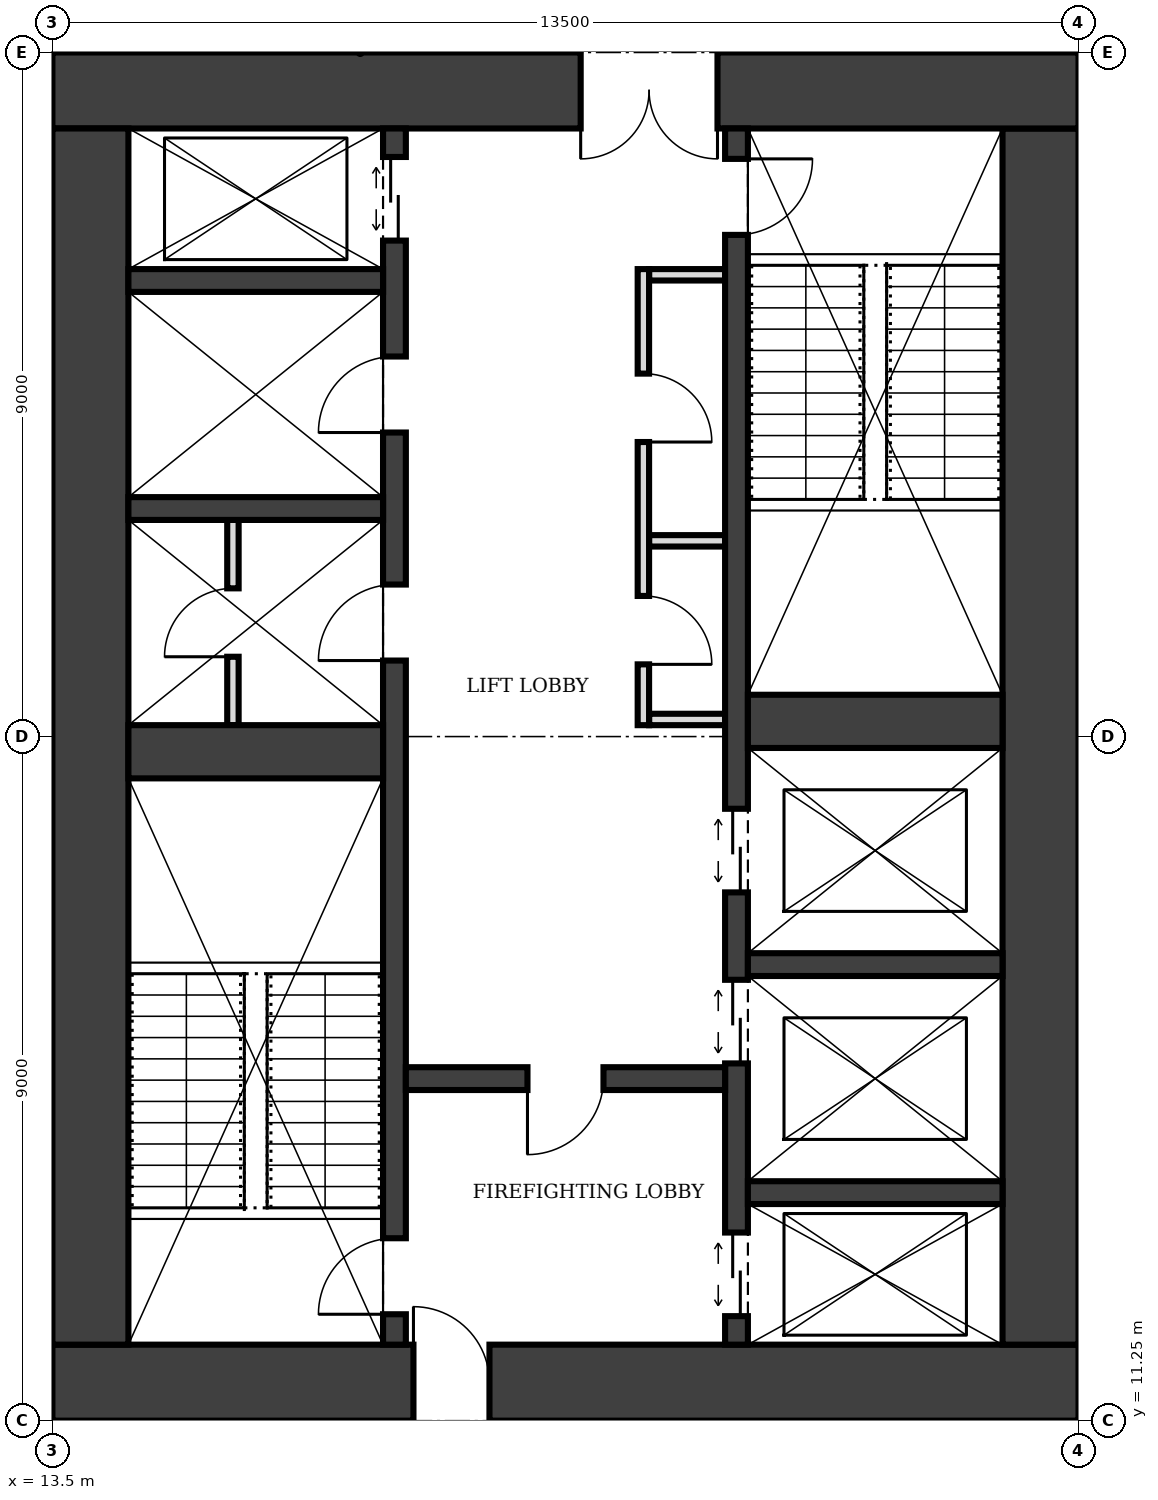
"""IFC4 building model, lengths in metres.
Left out: names, types, materials, properties, quantities, classifications, styles, units other than length and angle.
Written with IfcOpenShell. Run it as: python <this file> out.ifc"""

import sys

from ifc_helpers import new_model, si_unit, direction, frame, frame_2d, origin, place, context, subcontext, project, spatial, rectangle, extrude, element, fill, save


model = new_model("IFC4")
c1 = context("Model", 3, precision=1e-05, world=origin(), true_north=direction((0.0, 1.0)))
c2 = subcontext(c1, "Body", "Model", "MODEL_VIEW")
j1 = project(units=[si_unit("LENGTHUNIT", "METRE"), si_unit("PLANEANGLEUNIT", "RADIAN")], contexts=[c1])
p1 = place(None, origin())
s1 = spatial("IfcSite", under=j1, at=p1, CompositionType="ELEMENT")
p2 = place(p1, origin())
s2 = spatial("IfcBuilding", under=s1, at=p2, CompositionType="ELEMENT")
p3 = place(p2, frame((0.0, 0.0, 121.0)))
s3 = spatial("IfcBuildingStorey", under=s2, at=p3, CompositionType="ELEMENT", Elevation=121.0)
p4 = place(p3, frame((13.5, 11.75, 0.0), z_axis=(0.0, 0.0, 1.0), x_axis=(1.0, 0.0, 0.0)))
e1 = element("IfcWall", 1, at=p4, inside=s3, PredefinedType="SHEAR", context=c2, shape_type="SweptSolid", body=[
    extrude(rectangle(XDim=13.5, YDim=1.0, at=frame_2d((6.75, 0.0))), origin(), (0.0, 0.0, 1.0), 4.0),
])
p5 = place(p4, frame((4.75, 0.0, 0.0)))
e2 = element("IfcOpeningElement", 2, at=p5, cuts=e1, PredefinedType="OPENING", context=c2, shape_type="SweptSolid", body=[
    extrude(rectangle(XDim=1.0, YDim=2.1, at=frame_2d((0.5, 1.05))), frame((0.0, 0.51, 0.0), z_axis=(0.0, -1.0, 0.0), x_axis=(1.0, 0.0, 0.0)), (0.0, 0.0, 1.0), 1.02),
])
p6 = place(p3, frame((26.5, 12.25, 0.0), z_axis=(0.0, 0.0, 1.0), x_axis=(0.0, 1.0, 0.0)))
e3 = element("IfcWall", 3, at=p6, inside=s3, PredefinedType="SHEAR", context=c2, shape_type="SweptSolid", body=[
    extrude(rectangle(XDim=16.0, YDim=1.0, at=frame_2d((8.0, 0.0))), origin(), (0.0, 0.0, 1.0), 4.0),
])
p7 = place(p3, frame((27.0, 28.75, 0.0), z_axis=(0.0, 0.0, 1.0), x_axis=(-1.0, 0.0, 0.0)))
e4 = element("IfcWall", 4, at=p7, inside=s3, PredefinedType="SHEAR", context=c2, shape_type="SweptSolid", body=[
    extrude(rectangle(XDim=13.5, YDim=1.0, at=frame_2d((6.75, 0.0))), origin(), (0.0, 0.0, 1.0), 4.0),
])
p8 = place(p7, frame((4.75, 0.0, 0.0)))
e5 = element("IfcOpeningElement", 5, at=p8, cuts=e4, PredefinedType="OPENING", context=c2, shape_type="SweptSolid", body=[
    extrude(rectangle(XDim=1.8, YDim=2.1, at=frame_2d((0.9, 1.05))), frame((0.0, 0.51, 0.0), z_axis=(0.0, -1.0, 0.0), x_axis=(1.0, 0.0, 0.0)), (0.0, 0.0, 1.0), 1.02),
])
p9 = place(p3, frame((14.0, 28.25, 0.0), z_axis=(0.0, 0.0, 1.0), x_axis=(0.0, -1.0, 0.0)))
e6 = element("IfcWall", 6, at=p9, inside=s3, PredefinedType="SHEAR", context=c2, shape_type="SweptSolid", body=[
    extrude(rectangle(XDim=16.0, YDim=1.0, at=frame_2d((8.0, 0.0))), origin(), (0.0, 0.0, 1.0), 4.0),
])
p10 = place(p3, frame((18.0, 12.25, 0.0), z_axis=(0.0, 0.0, 1.0), x_axis=(0.0, 1.0, 0.0)))
e7 = element("IfcWall", 7, at=p10, inside=s3, PredefinedType="SHEAR", context=c2, shape_type="SweptSolid", body=[
    extrude(rectangle(XDim=16.0, YDim=0.3, at=frame_2d((8.0, 0.0))), origin(), (0.0, 0.0, 1.0), 4.0),
])
p11 = place(p10, frame((0.4, 0.0, 0.0)))
e8 = element("IfcOpeningElement", 8, at=p11, cuts=e7, PredefinedType="OPENING", context=c2, shape_type="SweptSolid", body=[
    extrude(rectangle(XDim=1.0, YDim=2.1, at=frame_2d((0.5, 1.05))), frame((0.0, 0.16, 0.0), z_axis=(0.0, -1.0, 0.0), x_axis=(1.0, 0.0, 0.0)), (0.0, 0.0, 1.0), 0.32),
])
p12 = place(p10, frame((14.525, 0.0, 0.0)))
e9 = element("IfcOpeningElement", 9, at=p12, cuts=e7, PredefinedType="OPENING", context=c2, shape_type="SweptSolid", body=[
    extrude(rectangle(XDim=1.1, YDim=2.1, at=frame_2d((0.55, 1.05))), frame((0.0, 0.16, 0.0), z_axis=(0.0, -1.0, 0.0), x_axis=(1.0, 0.0, 0.0)), (0.0, 0.0, 1.0), 0.32),
])
p13 = place(p10, frame((9.0, 0.0, 0.0)))
e10 = element("IfcOpeningElement", 10, at=p13, cuts=e7, PredefinedType="OPENING", context=c2, shape_type="SweptSolid", body=[
    extrude(rectangle(XDim=1.0, YDim=2.1, at=frame_2d((0.5, 1.05))), frame((0.0, 0.16, 0.0), z_axis=(0.0, -1.0, 0.0), x_axis=(1.0, 0.0, 0.0)), (0.0, 0.0, 1.0), 0.32),
])
p14 = place(p10, frame((12.0, 0.0, 0.0)))
e11 = element("IfcOpeningElement", 11, at=p14, cuts=e7, PredefinedType="OPENING", context=c2, shape_type="SweptSolid", body=[
    extrude(rectangle(XDim=1.0, YDim=2.1, at=frame_2d((0.5, 1.05))), frame((0.0, 0.16, 0.0), z_axis=(0.0, -1.0, 0.0), x_axis=(1.0, 0.0, 0.0)), (0.0, 0.0, 1.0), 0.32),
])
p15 = place(p3, frame((22.5, 12.25, 0.0), z_axis=(0.0, 0.0, 1.0), x_axis=(0.0, 1.0, 0.0)))
e12 = element("IfcWall", 12, at=p15, inside=s3, PredefinedType="SHEAR", context=c2, shape_type="SweptSolid", body=[
    extrude(rectangle(XDim=16.0, YDim=0.3, at=frame_2d((8.0, 0.0))), origin(), (0.0, 0.0, 1.0), 4.0),
])
p16 = place(p15, frame((14.6, 0.0, 0.0)))
e13 = element("IfcOpeningElement", 13, at=p16, cuts=e12, PredefinedType="OPENING", context=c2, shape_type="SweptSolid", body=[
    extrude(rectangle(XDim=1.0, YDim=2.1, at=frame_2d((0.5, 1.05))), frame((0.0, 0.16, 0.0), z_axis=(0.0, -1.0, 0.0), x_axis=(1.0, 0.0, 0.0)), (0.0, 0.0, 1.0), 0.32),
])
p17 = place(p15, frame((0.375, 0.0, 0.0)))
e14 = element("IfcOpeningElement", 14, at=p17, cuts=e12, PredefinedType="OPENING", context=c2, shape_type="SweptSolid", body=[
    extrude(rectangle(XDim=1.1, YDim=2.1, at=frame_2d((0.55, 1.05))), frame((0.0, 0.16, 0.0), z_axis=(0.0, -1.0, 0.0), x_axis=(1.0, 0.0, 0.0)), (0.0, 0.0, 1.0), 0.32),
])
p18 = place(p15, frame((3.7, 0.0, 0.0)))
e15 = element("IfcOpeningElement", 15, at=p18, cuts=e12, PredefinedType="OPENING", context=c2, shape_type="SweptSolid", body=[
    extrude(rectangle(XDim=1.1, YDim=2.1, at=frame_2d((0.55, 1.05))), frame((0.0, 0.16, 0.0), z_axis=(0.0, -1.0, 0.0), x_axis=(1.0, 0.0, 0.0)), (0.0, 0.0, 1.0), 0.32),
])
p19 = place(p15, frame((5.95, 0.0, 0.0)))
e16 = element("IfcOpeningElement", 16, at=p19, cuts=e12, PredefinedType="OPENING", context=c2, shape_type="SweptSolid", body=[
    extrude(rectangle(XDim=1.1, YDim=2.1, at=frame_2d((0.55, 1.05))), frame((0.0, 0.16, 0.0), z_axis=(0.0, -1.0, 0.0), x_axis=(1.0, 0.0, 0.0)), (0.0, 0.0, 1.0), 0.32),
])
p20 = place(p3, frame((14.5, 20.05, 0.0), z_axis=(0.0, 0.0, 1.0), x_axis=(1.0, 0.0, 0.0)))
e17 = element("IfcWall", 17, at=p20, inside=s3, PredefinedType="SHEAR", context=c2, shape_type="SweptSolid", body=[
    extrude(rectangle(XDim=3.35, YDim=0.7, at=frame_2d((1.675, 0.0))), origin(), (0.0, 0.0, 1.0), 4.0),
])
p21 = place(p3, frame((18.15, 15.75, 0.0), z_axis=(0.0, 0.0, 1.0), x_axis=(1.0, 0.0, 0.0)))
e18 = element("IfcWall", 18, at=p21, inside=s3, PredefinedType="SHEAR", context=c2, shape_type="SweptSolid", body=[
    extrude(rectangle(XDim=4.2, YDim=0.3, at=frame_2d((2.1, 0.0))), origin(), (0.0, 0.0, 1.0), 4.0),
])
p22 = place(p21, frame((1.6, 0.0, 0.0)))
e19 = element("IfcOpeningElement", 19, at=p22, cuts=e18, PredefinedType="OPENING", context=c2, shape_type="SweptSolid", body=[
    extrude(rectangle(XDim=1.0, YDim=2.1, at=frame_2d((0.5, 1.05))), frame((0.0, 0.16, 0.0), z_axis=(0.0, -1.0, 0.0), x_axis=(1.0, 0.0, 0.0)), (0.0, 0.0, 1.0), 0.32),
])
for number, where, z_axis, x_axis in (
    (20, (22.65, 14.25, 0.0), (0.0, 0.0, 1.0), (1.0, 0.0, 0.0)),
    (21, (22.65, 17.25, 0.0), (0.0, 0.0, 1.0), (1.0, 0.0, 0.0)),
):
    element("IfcWall", number, at=place(p3, frame(where, z_axis=z_axis, x_axis=x_axis)), inside=s3, PredefinedType="SHEAR", context=c2, shape_type="SweptSolid", body=[
        extrude(rectangle(XDim=3.35, YDim=0.3, at=frame_2d((1.675, 0.0))), origin(), (0.0, 0.0, 1.0), 4.0),
    ])
p23 = place(p3, frame((22.65, 20.45, 0.0), z_axis=(0.0, 0.0, 1.0), x_axis=(1.0, 0.0, 0.0)))
e22 = element("IfcWall", 22, at=p23, inside=s3, PredefinedType="SHEAR", context=c2, shape_type="SweptSolid", body=[
    extrude(rectangle(XDim=3.35, YDim=0.7, at=frame_2d((1.675, 0.0))), origin(), (0.0, 0.0, 1.0), 4.0),
])
for number, where, z_axis, x_axis in (
    (23, (14.5, 23.25, 0.0), (0.0, 0.0, 1.0), (1.0, 0.0, 0.0)),
    (24, (14.5, 26.25, 0.0), (0.0, 0.0, 1.0), (1.0, 0.0, 0.0)),
):
    element("IfcWall", number, at=place(p3, frame(where, z_axis=z_axis, x_axis=x_axis)), inside=s3, PredefinedType="SHEAR", context=c2, shape_type="SweptSolid", body=[
        extrude(rectangle(XDim=3.35, YDim=0.3, at=frame_2d((1.675, 0.0))), origin(), (0.0, 0.0, 1.0), 4.0),
    ])
p24 = place(p3, frame((21.275, 20.4, 0.0), z_axis=(0.0, 0.0, 1.0), x_axis=(0.0, 1.0, 0.0)))
e25 = element("IfcWall", 25, at=p24, inside=s3, PredefinedType="PARTITIONING", context=c2, shape_type="SweptSolid", body=[
    extrude(rectangle(XDim=6.0, YDim=0.15, at=frame_2d((3.0, 0.0))), origin(), (0.0, 0.0, 1.0), 3.75),
])
p25 = place(p24, frame((0.8, 0.0, 0.0)))
e26 = element("IfcOpeningElement", 26, at=p25, cuts=e25, PredefinedType="OPENING", context=c2, shape_type="SweptSolid", body=[
    extrude(rectangle(XDim=0.9, YDim=2.1, at=frame_2d((0.45, 1.05))), frame((0.0, 0.085, 0.0), z_axis=(0.0, -1.0, 0.0), x_axis=(1.0, 0.0, 0.0)), (0.0, 0.0, 1.0), 0.17),
])
p26 = place(p24, frame((3.725, 0.0, 0.0)))
e27 = element("IfcOpeningElement", 27, at=p26, cuts=e25, PredefinedType="OPENING", context=c2, shape_type="SweptSolid", body=[
    extrude(rectangle(XDim=0.9, YDim=2.1, at=frame_2d((0.45, 1.05))), frame((0.0, 0.085, 0.0), z_axis=(0.0, -1.0, 0.0), x_axis=(1.0, 0.0, 0.0)), (0.0, 0.0, 1.0), 0.17),
])
for number, where, z_axis, x_axis in (
    (28, (21.35, 20.475, 0.0), (0.0, 0.0, 1.0), (1.0, 0.0, 0.0)),
    (29, (21.35, 22.825, 0.0), (0.0, 0.0, 1.0), (1.0, 0.0, 0.0)),
    (30, (21.35, 26.325, 0.0), (0.0, 0.0, 1.0), (1.0, 0.0, 0.0)),
):
    element("IfcWall", number, at=place(p3, frame(where, z_axis=z_axis, x_axis=x_axis)), inside=s3, PredefinedType="PARTITIONING", context=c2, shape_type="SweptSolid", body=[
        extrude(rectangle(XDim=1.0, YDim=0.15, at=frame_2d((0.5, 0.0))), origin(), (0.0, 0.0, 1.0), 3.75),
    ])
p27 = place(p3, frame((15.875, 20.4, 0.0), z_axis=(0.0, 0.0, 1.0), x_axis=(0.0, 1.0, 0.0)))
e31 = element("IfcWall", 31, at=p27, inside=s3, PredefinedType="PARTITIONING", context=c2, shape_type="SweptSolid", body=[
    extrude(rectangle(XDim=2.7, YDim=0.15, at=frame_2d((1.35, 0.0))), origin(), (0.0, 0.0, 1.0), 3.75),
])
p28 = place(p27, frame((0.9, 0.0, 0.0)))
e32 = element("IfcOpeningElement", 32, at=p28, cuts=e31, PredefinedType="OPENING", context=c2, shape_type="SweptSolid", body=[
    extrude(rectangle(XDim=0.9, YDim=2.1, at=frame_2d((0.45, 1.05))), frame((0.0, 0.085, 0.0), z_axis=(0.0, -1.0, 0.0), x_axis=(1.0, 0.0, 0.0)), (0.0, 0.0, 1.0), 0.17),
])
p29 = place(p5, origin())
e33 = element("IfcDoor", 33, at=p29, inside=s3, OperationType="SINGLE_SWING_LEFT", PredefinedType="DOOR", context=c2, shape_type="SweptSolid", body=[
    extrude(rectangle(XDim=1.0, YDim=2.1, at=frame_2d((0.5, 1.05))), frame((0.0, 0.025, 0.0), z_axis=(0.0, -1.0, 0.0), x_axis=(1.0, 0.0, 0.0)), (0.0, 0.0, 1.0), 0.05),
])
fill(e2, e33)
p30 = place(p8, origin())
e34 = element("IfcDoor", 34, at=p30, inside=s3, OperationType="DOUBLE_DOOR_SINGLE_SWING", PredefinedType="DOOR", context=c2, shape_type="SweptSolid", body=[
    extrude(rectangle(XDim=1.8, YDim=2.1, at=frame_2d((0.9, 1.05))), frame((0.0, 0.025, 0.0), z_axis=(0.0, -1.0, 0.0), x_axis=(1.0, 0.0, 0.0)), (0.0, 0.0, 1.0), 0.05),
])
fill(e5, e34)
p31 = place(p22, frame((1.0, 0.0, 0.0), z_axis=(0.0, 0.0, 1.0), x_axis=(-1.0, 0.0, 0.0)))
e35 = element("IfcDoor", 35, at=p31, inside=s3, OperationType="SINGLE_SWING_RIGHT", PredefinedType="DOOR", context=c2, shape_type="SweptSolid", body=[
    extrude(rectangle(XDim=1.0, YDim=2.1, at=frame_2d((0.5, 1.05))), frame((0.0, 0.025, 0.0), z_axis=(0.0, -1.0, 0.0), x_axis=(1.0, 0.0, 0.0)), (0.0, 0.0, 1.0), 0.05),
])
fill(e19, e35)
p32 = place(p11, origin())
e36 = element("IfcDoor", 36, at=p32, inside=s3, OperationType="SINGLE_SWING_LEFT", PredefinedType="DOOR", context=c2, shape_type="SweptSolid", body=[
    extrude(rectangle(XDim=1.0, YDim=2.1, at=frame_2d((0.5, 1.05))), frame((0.0, 0.025, 0.0), z_axis=(0.0, -1.0, 0.0), x_axis=(1.0, 0.0, 0.0)), (0.0, 0.0, 1.0), 0.05),
])
fill(e8, e36)
p33 = place(p16, frame((1.0, 0.0, 0.0), z_axis=(0.0, 0.0, 1.0), x_axis=(-1.0, 0.0, 0.0)))
e37 = element("IfcDoor", 37, at=p33, inside=s3, OperationType="SINGLE_SWING_LEFT", PredefinedType="DOOR", context=c2, shape_type="SweptSolid", body=[
    extrude(rectangle(XDim=1.0, YDim=2.1, at=frame_2d((0.5, 1.05))), frame((0.0, 0.025, 0.0), z_axis=(0.0, -1.0, 0.0), x_axis=(1.0, 0.0, 0.0)), (0.0, 0.0, 1.0), 0.05),
])
fill(e13, e37)
p34 = place(p17, origin())
e38 = element("IfcDoor", 38, at=p34, inside=s3, OperationType="DOUBLE_DOOR_SLIDING", PredefinedType="DOOR", context=c2, shape_type="SweptSolid", body=[
    extrude(rectangle(XDim=1.1, YDim=2.1, at=frame_2d((0.55, 1.05))), frame((0.0, 0.025, 0.0), z_axis=(0.0, -1.0, 0.0), x_axis=(1.0, 0.0, 0.0)), (0.0, 0.0, 1.0), 0.05),
])
fill(e14, e38)
p35 = place(p12, origin())
e39 = element("IfcDoor", 39, at=p35, inside=s3, OperationType="DOUBLE_DOOR_SLIDING", PredefinedType="DOOR", context=c2, shape_type="SweptSolid", body=[
    extrude(rectangle(XDim=1.1, YDim=2.1, at=frame_2d((0.55, 1.05))), frame((0.0, 0.025, 0.0), z_axis=(0.0, -1.0, 0.0), x_axis=(1.0, 0.0, 0.0)), (0.0, 0.0, 1.0), 0.05),
])
fill(e9, e39)
p36 = place(p18, origin())
e40 = element("IfcDoor", 40, at=p36, inside=s3, OperationType="DOUBLE_DOOR_SLIDING", PredefinedType="DOOR", context=c2, shape_type="SweptSolid", body=[
    extrude(rectangle(XDim=1.1, YDim=2.1, at=frame_2d((0.55, 1.05))), frame((0.0, 0.025, 0.0), z_axis=(0.0, -1.0, 0.0), x_axis=(1.0, 0.0, 0.0)), (0.0, 0.0, 1.0), 0.05),
])
fill(e15, e40)
p37 = place(p19, origin())
e41 = element("IfcDoor", 41, at=p37, inside=s3, OperationType="DOUBLE_DOOR_SLIDING", PredefinedType="DOOR", context=c2, shape_type="SweptSolid", body=[
    extrude(rectangle(XDim=1.1, YDim=2.1, at=frame_2d((0.55, 1.05))), frame((0.0, 0.025, 0.0), z_axis=(0.0, -1.0, 0.0), x_axis=(1.0, 0.0, 0.0)), (0.0, 0.0, 1.0), 0.05),
])
fill(e16, e41)
p38 = place(p25, frame((0.9, 0.0, 0.0), z_axis=(0.0, 0.0, 1.0), x_axis=(-1.0, 0.0, 0.0)))
e42 = element("IfcDoor", 42, at=p38, inside=s3, OperationType="SINGLE_SWING_RIGHT", PredefinedType="DOOR", context=c2, shape_type="SweptSolid", body=[
    extrude(rectangle(XDim=0.9, YDim=2.1, at=frame_2d((0.45, 1.05))), frame((0.0, 0.025, 0.0), z_axis=(0.0, -1.0, 0.0), x_axis=(1.0, 0.0, 0.0)), (0.0, 0.0, 1.0), 0.05),
])
fill(e26, e42)
p39 = place(p26, frame((0.9, 0.0, 0.0), z_axis=(0.0, 0.0, 1.0), x_axis=(-1.0, 0.0, 0.0)))
e43 = element("IfcDoor", 43, at=p39, inside=s3, OperationType="SINGLE_SWING_RIGHT", PredefinedType="DOOR", context=c2, shape_type="SweptSolid", body=[
    extrude(rectangle(XDim=0.9, YDim=2.1, at=frame_2d((0.45, 1.05))), frame((0.0, 0.025, 0.0), z_axis=(0.0, -1.0, 0.0), x_axis=(1.0, 0.0, 0.0)), (0.0, 0.0, 1.0), 0.05),
])
fill(e27, e43)
p40 = place(p13, origin())
e44 = element("IfcDoor", 44, at=p40, inside=s3, OperationType="SINGLE_SWING_LEFT", PredefinedType="DOOR", context=c2, shape_type="SweptSolid", body=[
    extrude(rectangle(XDim=1.0, YDim=2.1, at=frame_2d((0.5, 1.05))), frame((0.0, 0.025, 0.0), z_axis=(0.0, -1.0, 0.0), x_axis=(1.0, 0.0, 0.0)), (0.0, 0.0, 1.0), 0.05),
])
fill(e10, e44)
p41 = place(p28, origin())
e45 = element("IfcDoor", 45, at=p41, inside=s3, OperationType="SINGLE_SWING_LEFT", PredefinedType="DOOR", context=c2, shape_type="SweptSolid", body=[
    extrude(rectangle(XDim=0.9, YDim=2.1, at=frame_2d((0.45, 1.05))), frame((0.0, 0.025, 0.0), z_axis=(0.0, -1.0, 0.0), x_axis=(1.0, 0.0, 0.0)), (0.0, 0.0, 1.0), 0.05),
])
fill(e32, e45)
p42 = place(p14, origin())
e46 = element("IfcDoor", 46, at=p42, inside=s3, OperationType="SINGLE_SWING_LEFT", PredefinedType="DOOR", context=c2, shape_type="SweptSolid", body=[
    extrude(rectangle(XDim=1.0, YDim=2.1, at=frame_2d((0.5, 1.05))), frame((0.0, 0.025, 0.0), z_axis=(0.0, -1.0, 0.0), x_axis=(1.0, 0.0, 0.0)), (0.0, 0.0, 1.0), 0.05),
])
fill(e11, e46)
save(model, sys.argv[1])
